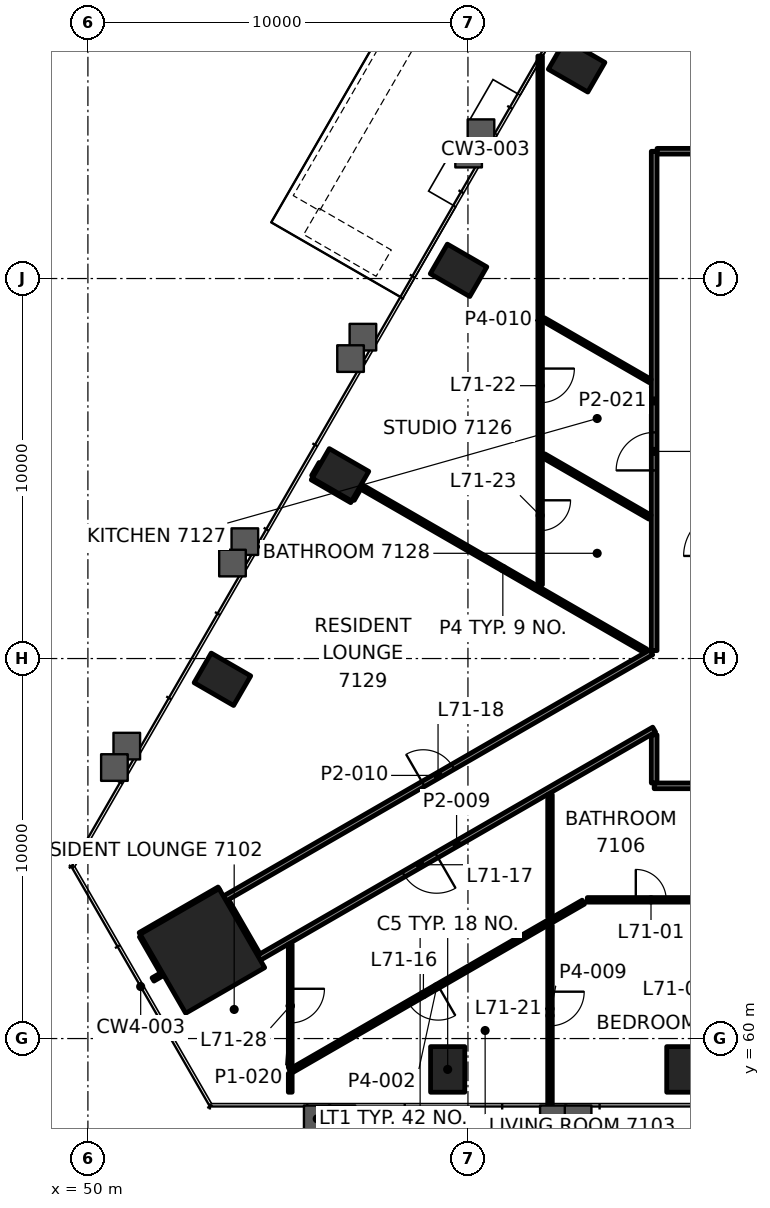
"""IFC4 building model, lengths in metres.
Left out: names, types, materials, properties, quantities, classifications, styles, units other than length and angle.
Written with IfcOpenShell. Run it as: python <this file> out.ifc"""

import sys

from ifc_helpers import new_model, si_unit, direction, frame, frame_2d, origin, origin_2d, place, context, subcontext, project, spatial, rectangle, hollow_rectangle, extrude, element, fill, save


model = new_model("IFC4")
c1 = context("Model", 3, precision=1e-05, world=origin(), true_north=direction((0.0, 1.0)))
c2 = subcontext(c1, "Body", "Model", "MODEL_VIEW")
j1 = project(units=[si_unit("LENGTHUNIT", "METRE"), si_unit("PLANEANGLEUNIT", "RADIAN")], contexts=[c1])
p1 = place(None, origin())
s1 = spatial("IfcSite", under=j1, at=p1, CompositionType="ELEMENT")
p2 = place(p1, origin())
s2 = spatial("IfcBuilding", under=s1, at=p2, CompositionType="ELEMENT")
p3 = place(p2, frame((0.0, 0.0, 295.1)))
s3 = spatial("IfcBuildingStorey", under=s2, at=p3, CompositionType="ELEMENT", Elevation=295.1)
p4 = place(p3, frame((53.012, 62.305, 0.0), z_axis=(0.0, 0.0, 1.0), x_axis=(0.5, -0.866025403784, 0.0)))
e1 = element("IfcColumn", 1, at=p4, inside=s3, PredefinedType="COLUMN", context=c2, shape_type="SweptSolid", body=[
    extrude(rectangle(XDim=2.4, YDim=2.4, at=origin_2d()), origin(), (0.0, 0.0, 1.0), 3.5),
])
for number, where, z_axis, x_axis in (
    (2, (59.467, 59.188, -0.0), (0.0, 0.0, 1.0), (1.0, 0.0, 0.0)),
    (3, (65.68, 59.188, -0.0), (0.0, 0.0, 1.0), (1.0, 0.0, 0.0)),
    (4, (62.859, 85.597, -0.0), (0.0, 0.0, 1.0), (-0.5, -0.866, 0.0)),
    (5, (59.753, 80.216, -0.0), (0.0, 0.0, 1.0), (-0.5, -0.866, 0.0)),
    (6, (56.646, 74.835, -0.0), (0.0, 0.0, 1.0), (-0.5, -0.866, 0.0)),
    (7, (53.539, 69.454, -0.0), (0.0, 0.0, 1.0), (-0.5, -0.866, 0.0)),
):
    element("IfcColumn", number, at=place(p3, frame(where, z_axis=z_axis, x_axis=x_axis)), inside=s3, PredefinedType="COLUMN", context=c2, shape_type="SweptSolid", body=[
        extrude(hollow_rectangle(XDim=0.9, YDim=1.2, WallThickness=0.06, at=origin_2d()), origin(), (0.0, 0.0, 1.0), 3.5),
    ])
p5 = place(p3, frame((63.141, 63.65, 0.0), z_axis=(0.0, 0.0, 1.0), x_axis=(1.0, 0.0, 0.0)))
e8 = element("IfcWall", 8, at=p5, inside=s3, PredefinedType="PARTITIONING", context=c2, shape_type="SweptSolid", body=[
    extrude(rectangle(XDim=23.718, YDim=0.12, at=frame_2d((11.859, 0.0))), origin(), (0.0, 0.0, 1.0), 2.7),
])
p6 = place(p5, frame((1.276, 0.0, 0.0)))
e9 = element("IfcOpeningElement", 9, at=p6, cuts=e8, PredefinedType="OPENING", context=c2, shape_type="SweptSolid", body=[
    extrude(rectangle(XDim=0.8, YDim=2.1, at=frame_2d((0.4, 1.05))), frame((0.0, 0.07, 0.0), z_axis=(0.0, -1.0, 0.0), x_axis=(1.0, 0.0, 0.0)), (0.0, 0.0, 1.0), 0.14),
])
p7 = place(p5, frame((3.43, 0.0, 0.0)))
e10 = element("IfcOpeningElement", 10, at=p7, cuts=e8, PredefinedType="OPENING", context=c2, shape_type="SweptSolid", body=[
    extrude(rectangle(XDim=0.9, YDim=2.1, at=frame_2d((0.45, 1.05))), frame((0.0, 0.07, 0.0), z_axis=(0.0, -1.0, 0.0), x_axis=(1.0, 0.0, 0.0)), (0.0, 0.0, 1.0), 0.14),
])
p8 = place(p5, frame((5.715, 0.0, 0.0)))
e11 = element("IfcOpeningElement", 11, at=p8, cuts=e8, PredefinedType="OPENING", context=c2, shape_type="SweptSolid", body=[
    extrude(rectangle(XDim=0.9, YDim=2.1, at=frame_2d((0.45, 1.05))), frame((0.0, 0.07, 0.0), z_axis=(0.0, -1.0, 0.0), x_axis=(1.0, 0.0, 0.0)), (0.0, 0.0, 1.0), 0.14),
])
p9 = place(p5, frame((8.87, 0.0, 0.0)))
e12 = element("IfcOpeningElement", 12, at=p9, cuts=e8, PredefinedType="OPENING", context=c2, shape_type="SweptSolid", body=[
    extrude(rectangle(XDim=0.8, YDim=2.1, at=frame_2d((0.4, 1.05))), frame((0.0, 0.07, 0.0), z_axis=(0.0, -1.0, 0.0), x_axis=(1.0, 0.0, 0.0)), (0.0, 0.0, 1.0), 0.14),
])
p10 = place(p5, frame((11.928, 0.0, 0.0)))
e13 = element("IfcOpeningElement", 13, at=p10, cuts=e8, PredefinedType="OPENING", context=c2, shape_type="SweptSolid", body=[
    extrude(rectangle(XDim=0.9, YDim=2.1, at=frame_2d((0.45, 1.05))), frame((0.0, 0.07, 0.0), z_axis=(0.0, -1.0, 0.0), x_axis=(1.0, 0.0, 0.0)), (0.0, 0.0, 1.0), 0.14),
])
p11 = place(p5, frame((15.083, 0.0, 0.0)))
e14 = element("IfcOpeningElement", 14, at=p11, cuts=e8, PredefinedType="OPENING", context=c2, shape_type="SweptSolid", body=[
    extrude(rectangle(XDim=0.8, YDim=2.1, at=frame_2d((0.4, 1.05))), frame((0.0, 0.07, 0.0), z_axis=(0.0, -1.0, 0.0), x_axis=(1.0, 0.0, 0.0)), (0.0, 0.0, 1.0), 0.14),
])
p12 = place(p5, frame((18.141, 0.0, 0.0)))
e15 = element("IfcOpeningElement", 15, at=p12, cuts=e8, PredefinedType="OPENING", context=c2, shape_type="SweptSolid", body=[
    extrude(rectangle(XDim=0.9, YDim=2.1, at=frame_2d((0.45, 1.05))), frame((0.0, 0.07, 0.0), z_axis=(0.0, -1.0, 0.0), x_axis=(1.0, 0.0, 0.0)), (0.0, 0.0, 1.0), 0.14),
])
p13 = place(p5, frame((21.297, 0.0, 0.0)))
e16 = element("IfcOpeningElement", 16, at=p13, cuts=e8, PredefinedType="OPENING", context=c2, shape_type="SweptSolid", body=[
    extrude(rectangle(XDim=0.8, YDim=2.1, at=frame_2d((0.4, 1.05))), frame((0.0, 0.07, 0.0), z_axis=(0.0, -1.0, 0.0), x_axis=(1.0, 0.0, 0.0)), (0.0, 0.0, 1.0), 0.14),
])
p14 = place(p3, frame((85.1, 66.65, 0.0), z_axis=(0.0, 0.0, 1.0), x_axis=(-1.0, 0.0, 0.0)))
e17 = element("IfcWall", 17, at=p14, inside=s3, PredefinedType="PARTITIONING", context=c2, shape_type="SweptSolid", body=[
    extrude(rectangle(XDim=20.2, YDim=0.15, at=frame_2d((10.1, 0.0))), origin(), (0.0, 0.0, 1.0), 2.7),
])
p15 = place(p14, frame((2.869, 0.0, 0.0)))
e18 = element("IfcOpeningElement", 18, at=p15, cuts=e17, PredefinedType="OPENING", context=c2, shape_type="SweptSolid", body=[
    extrude(rectangle(XDim=1.0, YDim=2.1, at=frame_2d((0.5, 1.05))), frame((0.0, 0.085, 0.0), z_axis=(0.0, -1.0, 0.0), x_axis=(1.0, 0.0, 0.0)), (0.0, 0.0, 1.0), 0.17),
])
p16 = place(p14, frame((9.082, 0.0, 0.0)))
e19 = element("IfcOpeningElement", 19, at=p16, cuts=e17, PredefinedType="OPENING", context=c2, shape_type="SweptSolid", body=[
    extrude(rectangle(XDim=1.0, YDim=2.1, at=frame_2d((0.5, 1.05))), frame((0.0, 0.085, 0.0), z_axis=(0.0, -1.0, 0.0), x_axis=(1.0, 0.0, 0.0)), (0.0, 0.0, 1.0), 0.17),
])
p17 = place(p14, frame((15.296, 0.0, 0.0)))
e20 = element("IfcOpeningElement", 20, at=p17, cuts=e17, PredefinedType="OPENING", context=c2, shape_type="SweptSolid", body=[
    extrude(rectangle(XDim=1.0, YDim=2.1, at=frame_2d((0.5, 1.05))), frame((0.0, 0.085, 0.0), z_axis=(0.0, -1.0, 0.0), x_axis=(1.0, 0.0, 0.0)), (0.0, 0.0, 1.0), 0.17),
])
p18 = place(p3, frame((64.977, 83.35, 0.0), z_axis=(0.0, 0.0, 1.0), x_axis=(1.0, 0.0, 0.0)))
e21 = element("IfcWall", 21, at=p18, inside=s3, PredefinedType="PARTITIONING", context=c2, shape_type="SweptSolid", body=[
    extrude(rectangle(XDim=6.823, YDim=0.15, at=frame_2d((3.412, 0.0))), origin(), (0.0, 0.0, 1.0), 2.7),
])
p19 = place(p18, frame((2.961, 0.0, 0.0)))
e22 = element("IfcOpeningElement", 22, at=p19, cuts=e21, PredefinedType="OPENING", context=c2, shape_type="SweptSolid", body=[
    extrude(rectangle(XDim=0.9, YDim=2.1, at=frame_2d((0.45, 1.05))), frame((0.0, 0.085, 0.0), z_axis=(0.0, -1.0, 0.0), x_axis=(1.0, 0.0, 0.0)), (0.0, 0.0, 1.0), 0.17),
])
p20 = place(p3, frame((63.037, 63.59, 0.0), z_axis=(0.0, 0.0, 1.0), x_axis=(-0.866021245731, -0.500007201891, 0.0)))
e23 = element("IfcWall", 23, at=p20, inside=s3, PredefinedType="PARTITIONING", context=c2, shape_type="SweptSolid", body=[
    extrude(rectangle(XDim=8.906, YDim=0.12, at=frame_2d((4.453, 0.0))), origin(), (0.0, 0.0, 1.0), 2.7),
])
p21 = place(p20, frame((4.41, 0.0, 0.0)))
e24 = element("IfcOpeningElement", 24, at=p21, cuts=e23, PredefinedType="OPENING", context=c2, shape_type="SweptSolid", body=[
    extrude(rectangle(XDim=0.9, YDim=2.1, at=frame_2d((0.45, 1.05))), frame((0.0, 0.07, 0.0), z_axis=(0.0, -1.0, 0.0), x_axis=(1.0, 0.0, 0.0)), (0.0, 0.0, 1.0), 0.14),
])
p22 = place(p3, frame((64.9, 68.13, 0.0), z_axis=(0.0, 0.0, 1.0), x_axis=(-0.866024746207, -0.500001138955, 0.0)))
e25 = element("IfcWall", 25, at=p22, inside=s3, PredefinedType="PARTITIONING", context=c2, shape_type="SweptSolid", body=[
    extrude(rectangle(XDim=12.007, YDim=0.15, at=frame_2d((6.003, 0.0))), origin(), (0.0, 0.0, 1.0), 2.547),
])
p23 = place(p22, frame((6.611, 0.0, 0.0)))
e26 = element("IfcOpeningElement", 26, at=p23, cuts=e25, PredefinedType="OPENING", context=c2, shape_type="SweptSolid", body=[
    extrude(rectangle(XDim=1.0, YDim=2.1, at=frame_2d((0.5, 1.05))), frame((0.0, 0.085, 0.0), z_axis=(0.0, -1.0, 0.0), x_axis=(1.0, 0.0, 0.0)), (0.0, 0.0, 1.0), 0.17),
])
p24 = place(p3, frame((51.713, 61.555, 0.0), z_axis=(0.0, 0.0, 1.0), x_axis=(0.866071776036, 0.499919672301, 0.0)))
e27 = element("IfcWall", 27, at=p24, inside=s3, PredefinedType="PARTITIONING", context=c2, shape_type="SweptSolid", body=[
    extrude(rectangle(XDim=0.25, YDim=0.1, at=frame_2d((0.125, 0.0))), origin(), (0.0, 0.0, 1.0), 2.7),
])
p25 = place(p3, frame((53.601, 63.685, 0.0), z_axis=(0.0, 0.0, 1.0), x_axis=(0.866024967991, 0.500000754816, 0.0)))
e28 = element("IfcWall", 28, at=p25, inside=s3, PredefinedType="PARTITIONING", context=c2, shape_type="SweptSolid", body=[
    extrude(rectangle(XDim=12.96, YDim=0.15, at=frame_2d((6.48, 0.0))), origin(), (0.0, 0.0, 1.0), 2.7),
])
p26 = place(p25, frame((6.03, 0.0, 0.0)))
e29 = element("IfcOpeningElement", 29, at=p26, cuts=e28, PredefinedType="OPENING", context=c2, shape_type="SweptSolid", body=[
    extrude(rectangle(XDim=0.9, YDim=2.1, at=frame_2d((0.45, 1.05))), frame((0.0, 0.085, 0.0), z_axis=(0.0, -1.0, 0.0), x_axis=(1.0, 0.0, 0.0)), (0.0, 0.0, 1.0), 0.17),
])
p27 = place(p3, frame((51.373, 62.745, 0.0), z_axis=(0.0, 0.0, 1.0), x_axis=(0.866036455013, 0.499980858223, 0.0)))
e30 = element("IfcWall", 30, at=p27, inside=s3, PredefinedType="PARTITIONING", context=c2, shape_type="SweptSolid", body=[
    extrude(rectangle(XDim=2.399, YDim=0.1, at=frame_2d((1.199, 0.0))), origin(), (0.0, 0.0, 1.0), 2.7),
])
p28 = place(p3, frame((56.966, 74.189, 0.0), z_axis=(0.0, 0.0, 1.0), x_axis=(0.499930013145, 0.866065806944, 0.0)))
e31 = element("IfcWall", 31, at=p28, inside=s3, PredefinedType="PARTITIONING", context=c2, shape_type="SweptSolid", body=[
    extrude(rectangle(XDim=0.339, YDim=0.1, at=frame_2d((0.17, 0.0))), origin(), (0.0, 0.0, 1.0), 2.7),
])
p29 = place(p3, frame((55.93, 74.794, 0.0), z_axis=(0.0, 0.0, 1.0), x_axis=(0.500080938595, 0.865978668822, 0.0)))
e32 = element("IfcWall", 32, at=p29, inside=s3, PredefinedType="PARTITIONING", context=c2, shape_type="SweptSolid", body=[
    extrude(rectangle(XDim=0.393, YDim=0.1, at=frame_2d((0.197, 0.0))), origin(), (0.0, 0.0, 1.0), 2.7),
])
p30 = place(p3, frame((64.9, 66.725, 0.0), z_axis=(0.0, 0.0, 1.0), x_axis=(0.0, 1.0, 0.0)))
e33 = element("IfcWall", 33, at=p30, inside=s3, PredefinedType="PARTITIONING", context=c2, shape_type="SweptSolid", body=[
    extrude(rectangle(XDim=1.268, YDim=0.15, at=frame_2d((0.634, 0.0))), origin(), (0.0, 0.0, 1.0), 2.547),
])
p31 = place(p3, frame((64.9, 70.208, 0.0), z_axis=(0.0, 0.0, 1.0), x_axis=(0.0, 1.0, 0.0)))
e34 = element("IfcWall", 34, at=p31, inside=s3, PredefinedType="PARTITIONING", context=c2, shape_type="SweptSolid", body=[
    extrude(rectangle(XDim=13.14, YDim=0.15, at=frame_2d((6.57, 0.0))), origin(), (0.0, 0.0, 1.0), 2.7),
])
p32 = place(p31, frame((4.743, 0.0, 0.0)))
e35 = element("IfcOpeningElement", 35, at=p32, cuts=e34, PredefinedType="OPENING", context=c2, shape_type="SweptSolid", body=[
    extrude(rectangle(XDim=1.0, YDim=2.1, at=frame_2d((0.5, 1.05))), frame((0.0, 0.085, 0.0), z_axis=(0.0, -1.0, 0.0), x_axis=(1.0, 0.0, 0.0)), (0.0, 0.0, 1.0), 0.17),
])
p33 = place(p3, frame((62.159, 62.979, 0.0), z_axis=(0.0, 0.0, 1.0), x_axis=(0.0, -1.0, 0.0)))
e36 = element("IfcWall", 36, at=p33, inside=s3, PredefinedType="PARTITIONING", context=c2, shape_type="SweptSolid", body=[
    extrude(rectangle(XDim=4.751, YDim=0.12, at=frame_2d((2.376, 0.0))), origin(), (0.0, 0.0, 1.0), 2.688),
])
p34 = place(p33, frame((1.746, 0.0, 0.0)))
e37 = element("IfcOpeningElement", 37, at=p34, cuts=e36, PredefinedType="OPENING", context=c2, shape_type="SweptSolid", body=[
    extrude(rectangle(XDim=0.9, YDim=2.1, at=frame_2d((0.45, 1.05))), frame((0.0, 0.07, 0.0), z_axis=(0.0, -1.0, 0.0), x_axis=(1.0, 0.0, 0.0)), (0.0, 0.0, 1.0), 0.14),
])
p35 = place(p3, frame((61.9, 85.855, 0.0), z_axis=(0.0, 0.0, 1.0), x_axis=(0.0, -1.0, 0.0)))
e38 = element("IfcWall", 38, at=p35, inside=s3, PredefinedType="PARTITIONING", context=c2, shape_type="SweptSolid", body=[
    extrude(rectangle(XDim=13.915, YDim=0.12, at=frame_2d((6.958, 0.0))), origin(), (0.0, 0.0, 1.0), 2.688),
])
p36 = place(p35, frame((8.224, 0.0, 0.0)))
e39 = element("IfcOpeningElement", 39, at=p36, cuts=e38, PredefinedType="OPENING", context=c2, shape_type="SweptSolid", body=[
    extrude(rectangle(XDim=0.9, YDim=2.1, at=frame_2d((0.45, 1.05))), frame((0.0, 0.07, 0.0), z_axis=(0.0, -1.0, 0.0), x_axis=(1.0, 0.0, 0.0)), (0.0, 0.0, 1.0), 0.14),
])
p37 = place(p35, frame((11.69, 0.0, 0.0)))
e40 = element("IfcOpeningElement", 40, at=p37, cuts=e38, PredefinedType="OPENING", context=c2, shape_type="SweptSolid", body=[
    extrude(rectangle(XDim=0.8, YDim=2.1, at=frame_2d((0.4, 1.05))), frame((0.0, 0.07, 0.0), z_axis=(0.0, -1.0, 0.0), x_axis=(1.0, 0.0, 0.0)), (0.0, 0.0, 1.0), 0.14),
])
p38 = place(p3, frame((55.324, 58.588, 0.0), z_axis=(0.0, 0.0, 1.0), x_axis=(0.0, 1.0, 0.0)))
e41 = element("IfcWall", 41, at=p38, inside=s3, PredefinedType="PARTITIONING", context=c2, shape_type="SweptSolid", body=[
    extrude(rectangle(XDim=0.498, YDim=0.1, at=frame_2d((0.249, 0.0))), origin(), (0.0, 0.0, 1.0), 2.7),
])
p39 = place(p3, frame((54.464, 62.191, 0.0), z_axis=(0.0, 0.0, 1.0), x_axis=(-0.499988108725, 0.866032269107, 0.0)))
e42 = element("IfcWall", 42, at=p39, inside=s3, PredefinedType="PARTITIONING", context=c2, shape_type="SweptSolid", body=[
    extrude(rectangle(XDim=1.644, YDim=0.15, at=frame_2d((0.822, 0.0))), origin(), (0.0, 0.0, 1.0), 2.547),
])
p40 = place(p3, frame((51.973, 61.706, 0.0), z_axis=(0.0, 0.0, 1.0), x_axis=(-0.500022773673, 0.866012254999, 0.0)))
e43 = element("IfcWall", 43, at=p40, inside=s3, PredefinedType="PARTITIONING", context=c2, shape_type="SweptSolid", body=[
    extrude(rectangle(XDim=1.149, YDim=0.1, at=frame_2d((0.575, 0.0))), origin(), (0.0, 0.0, 1.0), 2.7),
])
p41 = place(p3, frame((64.799, 77.302, 0.0), z_axis=(0.0, 0.0, 1.0), x_axis=(-0.866000336211, 0.500043415797, 0.0)))
e44 = element("IfcWall", 44, at=p41, inside=s3, PredefinedType="PARTITIONING", context=c2, shape_type="SweptSolid", body=[
    extrude(rectangle(XDim=3.248, YDim=0.1, at=frame_2d((1.624, 0.0))), origin(), (0.0, 0.0, 1.0), 2.7),
])
p42 = place(p3, frame((64.791, 73.72, 0.0), z_axis=(0.0, 0.0, 1.0), x_axis=(-0.866033195618, 0.499986503906, 0.0)))
e45 = element("IfcWall", 45, at=p42, inside=s3, PredefinedType="PARTITIONING", context=c2, shape_type="SweptSolid", body=[
    extrude(rectangle(XDim=3.228, YDim=0.12, at=frame_2d((1.614, 0.0))), origin(), (0.0, 0.0, 1.0), 2.7),
])
p43 = place(p3, frame((64.67, 70.202, 0.0), z_axis=(0.0, 0.0, 1.0), x_axis=(-0.866027476775, 0.499996409458, 0.0)))
e46 = element("IfcWall", 46, at=p43, inside=s3, PredefinedType="PARTITIONING", context=c2, shape_type="SweptSolid", body=[
    extrude(rectangle(XDim=8.666, YDim=0.12, at=frame_2d((4.333, 0.0))), origin(), (0.0, 0.0, 1.0), 2.7),
])
p44 = place(p3, frame((56.94, 74.146, 0.0), z_axis=(0.0, 0.0, 1.0), x_axis=(-0.86611778647, 0.499839954345, 0.0)))
e47 = element("IfcWall", 47, at=p44, inside=s3, PredefinedType="PARTITIONING", context=c2, shape_type="SweptSolid", body=[
    extrude(rectangle(XDim=1.199, YDim=0.1, at=frame_2d((0.6, 0.0))), origin(), (0.0, 0.0, 1.0), 2.7),
])
p45 = place(p3, frame((62.159, 63.187, 0.0), z_axis=(0.0, 0.0, 1.0), x_axis=(0.0, 1.0, 0.0)))
e48 = element("IfcWall", 48, at=p45, inside=s3, PredefinedType="PARTITIONING", context=c2, shape_type="SweptSolid", body=[
    extrude(rectangle(XDim=3.233, YDim=0.12, at=frame_2d((1.617, 0.0))), origin(), (0.0, 0.0, 1.0), 2.547),
])
p46 = place(p3, frame((55.324, 62.484, 0.0), z_axis=(0.0, 0.0, 1.0), x_axis=(0.0, -1.0, 0.0)))
e49 = element("IfcWall", 49, at=p46, inside=s3, PredefinedType="PARTITIONING", context=c2, shape_type="SweptSolid", body=[
    extrude(rectangle(XDim=3.25, YDim=0.1, at=frame_2d((1.625, 0.0))), origin(), (0.0, 0.0, 1.0), 2.7),
])
p47 = place(p46, frame((1.175, 0.0, 0.0)))
e50 = element("IfcOpeningElement", 50, at=p47, cuts=e49, PredefinedType="OPENING", context=c2, shape_type="SweptSolid", body=[
    extrude(rectangle(XDim=0.9, YDim=2.1, at=frame_2d((0.45, 1.05))), frame((0.0, 0.06, 0.0), z_axis=(0.0, -1.0, 0.0), x_axis=(1.0, 0.0, 0.0)), (0.0, 0.0, 1.0), 0.12),
])
p48 = place(p3, frame((69.117, 105.135, 0.0), z_axis=(0.0, 0.0, 1.0), x_axis=(-0.500000972034, -0.86602484258, 0.0)))
e51 = element("IfcWall", 51, at=p48, inside=s3, PredefinedType="SOLIDWALL", context=c2, shape_type="SweptSolid", body=[
    extrude(rectangle(XDim=26.734, YDim=0.8, at=frame_2d((13.367, 0.0))), origin(), (0.0, 0.0, 1.0), 0.9),
])
p49 = place(p3, frame((55.878, 81.504, 0.0), z_axis=(0.0, 0.0, 1.0), x_axis=(0.866008176907, -0.50002983664, 0.0)))
e52 = element("IfcWall", 52, at=p49, inside=s3, PredefinedType="SOLIDWALL", context=c2, shape_type="SweptSolid", body=[
    extrude(rectangle(XDim=2.2, YDim=0.8, at=frame_2d((1.1, 0.0))), origin(), (0.0, 0.0, 1.0), 0.9),
])
p50 = place(p6, origin())
e53 = element("IfcDoor", 53, at=p50, inside=s3, OperationType="SINGLE_SWING_RIGHT", PredefinedType="DOOR", context=c2, shape_type="SweptSolid", body=[
    extrude(rectangle(XDim=0.8, YDim=2.1, at=frame_2d((0.4, 1.05))), frame((0.0, 0.025, 0.0), z_axis=(0.0, -1.0, 0.0), x_axis=(1.0, 0.0, 0.0)), (0.0, 0.0, 1.0), 0.05),
])
fill(e9, e53)
p51 = place(p21, origin())
e54 = element("IfcDoor", 54, at=p51, inside=s3, OperationType="SINGLE_SWING_LEFT", PredefinedType="DOOR", context=c2, shape_type="SweptSolid", body=[
    extrude(rectangle(XDim=0.9, YDim=2.1, at=frame_2d((0.45, 1.05))), frame((0.0, 0.025, 0.0), z_axis=(0.0, -1.0, 0.0), x_axis=(1.0, 0.0, 0.0)), (0.0, 0.0, 1.0), 0.05),
])
fill(e24, e54)
p52 = place(p23, origin())
e55 = element("IfcDoor", 55, at=p52, inside=s3, OperationType="SINGLE_SWING_RIGHT", PredefinedType="DOOR", context=c2, shape_type="SweptSolid", body=[
    extrude(rectangle(XDim=1.0, YDim=2.1, at=frame_2d((0.5, 1.05))), frame((0.0, 0.025, 0.0), z_axis=(0.0, -1.0, 0.0), x_axis=(1.0, 0.0, 0.0)), (0.0, 0.0, 1.0), 0.05),
])
fill(e26, e55)
p53 = place(p26, origin())
e56 = element("IfcDoor", 56, at=p53, inside=s3, OperationType="SINGLE_SWING_RIGHT", PredefinedType="DOOR", context=c2, shape_type="SweptSolid", body=[
    extrude(rectangle(XDim=0.9, YDim=2.1, at=frame_2d((0.45, 1.05))), frame((0.0, 0.025, 0.0), z_axis=(0.0, -1.0, 0.0), x_axis=(1.0, 0.0, 0.0)), (0.0, 0.0, 1.0), 0.05),
])
fill(e29, e56)
p54 = place(p32, origin())
e57 = element("IfcDoor", 57, at=p54, inside=s3, OperationType="SINGLE_SWING_RIGHT", PredefinedType="DOOR", context=c2, shape_type="SweptSolid", body=[
    extrude(rectangle(XDim=1.0, YDim=2.1, at=frame_2d((0.5, 1.05))), frame((0.0, 0.025, 0.0), z_axis=(0.0, -1.0, 0.0), x_axis=(1.0, 0.0, 0.0)), (0.0, 0.0, 1.0), 0.05),
])
fill(e35, e57)
p55 = place(p34, origin())
e58 = element("IfcDoor", 58, at=p55, inside=s3, OperationType="SINGLE_SWING_LEFT", PredefinedType="DOOR", context=c2, shape_type="SweptSolid", body=[
    extrude(rectangle(XDim=0.9, YDim=2.1, at=frame_2d((0.45, 1.05))), frame((0.0, 0.025, 0.0), z_axis=(0.0, -1.0, 0.0), x_axis=(1.0, 0.0, 0.0)), (0.0, 0.0, 1.0), 0.05),
])
fill(e37, e58)
p56 = place(p36, origin())
e59 = element("IfcDoor", 59, at=p56, inside=s3, OperationType="SINGLE_SWING_RIGHT", PredefinedType="DOOR", context=c2, shape_type="SweptSolid", body=[
    extrude(rectangle(XDim=0.9, YDim=2.1, at=frame_2d((0.45, 1.05))), frame((0.0, 0.025, 0.0), z_axis=(0.0, -1.0, 0.0), x_axis=(1.0, 0.0, 0.0)), (0.0, 0.0, 1.0), 0.05),
])
fill(e39, e59)
p57 = place(p37, origin())
e60 = element("IfcDoor", 60, at=p57, inside=s3, OperationType="SINGLE_SWING_RIGHT", PredefinedType="DOOR", context=c2, shape_type="SweptSolid", body=[
    extrude(rectangle(XDim=0.8, YDim=2.1, at=frame_2d((0.4, 1.05))), frame((0.0, 0.025, 0.0), z_axis=(0.0, -1.0, 0.0), x_axis=(1.0, 0.0, 0.0)), (0.0, 0.0, 1.0), 0.05),
])
fill(e40, e60)
p58 = place(p47, origin())
e61 = element("IfcDoor", 61, at=p58, inside=s3, OperationType="SINGLE_SWING_RIGHT", PredefinedType="DOOR", context=c2, shape_type="SweptSolid", body=[
    extrude(rectangle(XDim=0.9, YDim=2.1, at=frame_2d((0.45, 1.05))), frame((0.0, 0.025, 0.0), z_axis=(0.0, -1.0, 0.0), x_axis=(1.0, 0.0, 0.0)), (0.0, 0.0, 1.0), 0.05),
])
fill(e50, e61)
save(model, sys.argv[1])
